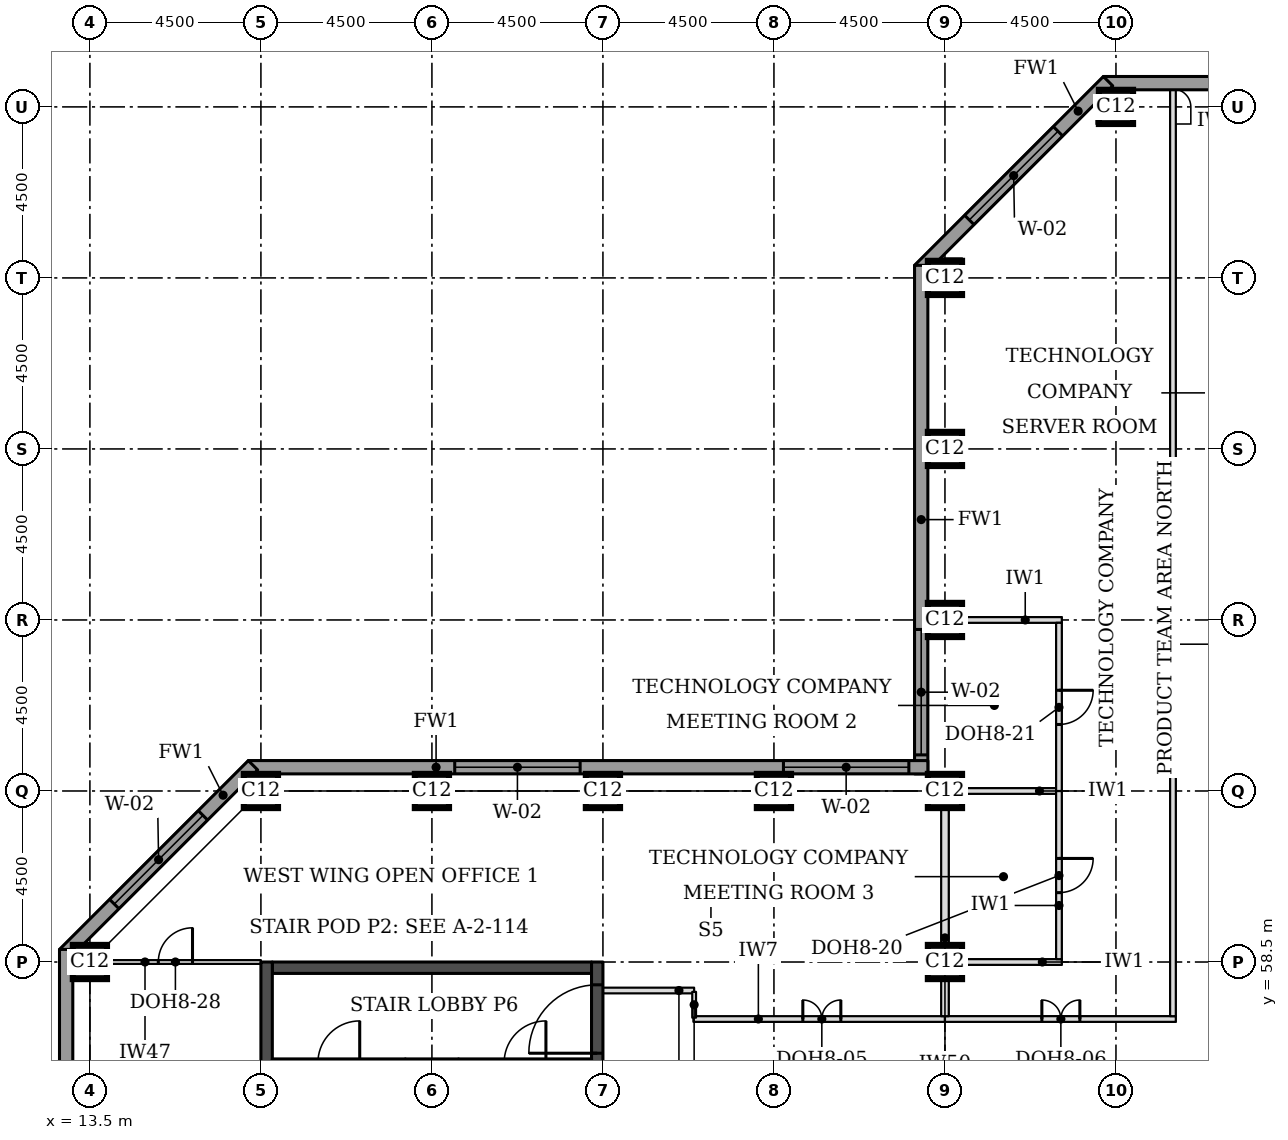
"""IFC4 building model, lengths in metres.
Left out: names, types, materials, properties, quantities, classifications, styles, units other than length and angle.
Written with IfcOpenShell. Run it as: python <this file> out.ifc"""

import sys

from ifc_helpers import new_model, si_unit, direction, frame, frame_2d, origin, origin_2d, place, context, subcontext, project, spatial, rectangle, extrude, element, fill, save


model = new_model("IFC4")
c1 = context("Model", 3, precision=1e-05, world=origin(), true_north=direction((0.0, 1.0)))
c2 = subcontext(c1, "Body", "Model", "MODEL_VIEW")
j1 = project(units=[si_unit("LENGTHUNIT", "METRE"), si_unit("PLANEANGLEUNIT", "RADIAN")], contexts=[c1])
p1 = place(None, origin())
s1 = spatial("IfcSite", under=j1, at=p1, CompositionType="ELEMENT")
p2 = place(p1, origin())
s2 = spatial("IfcBuilding", under=s1, at=p2, CompositionType="ELEMENT")
p3 = place(p2, frame((0.0, 0.0, 199.5)))
s3 = spatial("IfcBuildingStorey", under=s2, at=p3, CompositionType="ELEMENT", Elevation=199.5)
for number, where, z_axis, x_axis in (
    (1, (13.5, 58.5, 0.0), (0.0, 0.0, 1.0), (1.0, 0.0, 0.0)),
    (2, (36.0, 58.5, 0.0), (0.0, 0.0, 1.0), (1.0, 0.0, 0.0)),
    (3, (18.0, 63.0, 0.0), (0.0, 0.0, 1.0), (1.0, 0.0, 0.0)),
    (4, (22.5, 63.0, 0.0), (0.0, 0.0, 1.0), (1.0, 0.0, 0.0)),
    (5, (27.0, 63.0, 0.0), (0.0, 0.0, 1.0), (1.0, 0.0, 0.0)),
    (6, (31.5, 63.0, 0.0), (0.0, 0.0, 1.0), (1.0, 0.0, 0.0)),
    (7, (36.0, 63.0, 0.0), (0.0, 0.0, 1.0), (1.0, 0.0, 0.0)),
    (8, (36.0, 67.5, 0.0), (0.0, 0.0, 1.0), (1.0, 0.0, 0.0)),
    (9, (36.0, 72.0, 0.0), (0.0, 0.0, 1.0), (1.0, 0.0, 0.0)),
    (10, (36.0, 76.5, 0.0), (0.0, 0.0, 1.0), (1.0, 0.0, 0.0)),
    (11, (40.5, 81.0, 0.0), (0.0, 0.0, 1.0), (1.0, 0.0, 0.0)),
):
    element("IfcColumn", number, at=place(p3, frame(where, z_axis=z_axis, x_axis=x_axis)), inside=s3, PredefinedType="COLUMN", context=c2, shape_type="SweptSolid", body=[
        extrude(rectangle(XDim=0.9, YDim=0.9, at=origin_2d()), origin(), (0.0, 0.0, 1.0), 3.7),
    ])
p4 = place(p3, frame((18.3, 58.35, 0.0), z_axis=(0.0, 0.0, 1.0), x_axis=(1.0, 0.0, 0.0)))
e12 = element("IfcWall", 12, at=p4, inside=s3, PredefinedType="SHEAR", context=c2, shape_type="SweptSolid", body=[
    extrude(rectangle(XDim=8.4, YDim=0.3, at=frame_2d((4.2, 0.0))), origin(), (0.0, 0.0, 1.0), 3.7),
])
p5 = place(p3, frame((18.15, 49.5, 0.0), z_axis=(0.0, 0.0, 1.0), x_axis=(0.0, 1.0, 0.0)))
e13 = element("IfcWall", 13, at=p5, inside=s3, PredefinedType="SHEAR", context=c2, shape_type="SweptSolid", body=[
    extrude(rectangle(XDim=9.0, YDim=0.3, at=frame_2d((4.5, 0.0))), origin(), (0.0, 0.0, 1.0), 3.7),
])
p6 = place(p3, frame((26.85, 49.5, 0.0), z_axis=(0.0, 0.0, 1.0), x_axis=(0.0, 1.0, 0.0)))
e14 = element("IfcWall", 14, at=p6, inside=s3, PredefinedType="SHEAR", context=c2, shape_type="SweptSolid", body=[
    extrude(rectangle(XDim=9.0, YDim=0.3, at=frame_2d((4.5, 0.0))), origin(), (0.0, 0.0, 1.0), 3.7),
])
p7 = place(p6, frame((6.6, 0.0, 0.0)))
e15 = element("IfcOpeningElement", 15, at=p7, cuts=e14, PredefinedType="OPENING", context=c2, shape_type="SweptSolid", body=[
    extrude(rectangle(XDim=1.8, YDim=2.1, at=frame_2d((0.9, 1.05))), frame((0.0, 0.16, 0.0), z_axis=(0.0, -1.0, 0.0), x_axis=(1.0, 0.0, 0.0)), (0.0, 0.0, 1.0), 0.32),
])
p8 = place(p3, frame((72.331, 81.625, 0.0), z_axis=(0.0, 0.0, 1.0), x_axis=(-1.0, 0.0, 0.0)))
e16 = element("IfcWall", 16, at=p8, inside=s3, PredefinedType="STANDARD", context=c2, shape_type="SweptSolid", body=[
    extrude(rectangle(XDim=32.163, YDim=0.35, at=frame_2d((16.081, 0.0))), origin(), (0.0, 0.0, 1.0), 3.525),
])
p9 = place(p8, frame((5.431, 0.0, 0.9)))
e17 = element("IfcOpeningElement", 17, at=p9, cuts=e16, PredefinedType="OPENING", context=c2, shape_type="SweptSolid", body=[
    extrude(rectangle(XDim=3.3, YDim=1.9, at=frame_2d((1.65, 0.95))), frame((0.0, 0.185, 0.0), z_axis=(0.0, -1.0, 0.0), x_axis=(1.0, 0.0, 0.0)), (0.0, 0.0, 1.0), 0.37),
])
p10 = place(p8, frame((9.931, 0.0, 0.9)))
e18 = element("IfcOpeningElement", 18, at=p10, cuts=e16, PredefinedType="OPENING", context=c2, shape_type="SweptSolid", body=[
    extrude(rectangle(XDim=3.3, YDim=1.9, at=frame_2d((1.65, 0.95))), frame((0.0, 0.185, 0.0), z_axis=(0.0, -1.0, 0.0), x_axis=(1.0, 0.0, 0.0)), (0.0, 0.0, 1.0), 0.37),
])
p11 = place(p8, frame((14.431, 0.0, 0.9)))
e19 = element("IfcOpeningElement", 19, at=p11, cuts=e16, PredefinedType="OPENING", context=c2, shape_type="SweptSolid", body=[
    extrude(rectangle(XDim=3.3, YDim=1.9, at=frame_2d((1.65, 0.95))), frame((0.0, 0.185, 0.0), z_axis=(0.0, -1.0, 0.0), x_axis=(1.0, 0.0, 0.0)), (0.0, 0.0, 1.0), 0.37),
])
p12 = place(p8, frame((18.931, 0.0, 0.9)))
e20 = element("IfcOpeningElement", 20, at=p12, cuts=e16, PredefinedType="OPENING", context=c2, shape_type="SweptSolid", body=[
    extrude(rectangle(XDim=3.3, YDim=1.9, at=frame_2d((1.65, 0.95))), frame((0.0, 0.185, 0.0), z_axis=(0.0, -1.0, 0.0), x_axis=(1.0, 0.0, 0.0)), (0.0, 0.0, 1.0), 0.37),
])
p13 = place(p8, frame((23.431, 0.0, 0.9)))
e21 = element("IfcOpeningElement", 21, at=p13, cuts=e16, PredefinedType="OPENING", context=c2, shape_type="SweptSolid", body=[
    extrude(rectangle(XDim=3.3, YDim=1.9, at=frame_2d((1.65, 0.95))), frame((0.0, 0.185, 0.0), z_axis=(0.0, -1.0, 0.0), x_axis=(1.0, 0.0, 0.0)), (0.0, 0.0, 1.0), 0.37),
])
p14 = place(p3, frame((40.292, 81.676, 0.0), z_axis=(0.0, 0.0, 1.0), x_axis=(-0.707106781187, -0.707106781187, 0.0)))
e22 = element("IfcWall", 22, at=p14, inside=s3, PredefinedType="STANDARD", context=c2, shape_type="SweptSolid", body=[
    extrude(rectangle(XDim=7.027, YDim=0.35, at=frame_2d((3.513, 0.0))), origin(), (0.0, 0.0, 1.0), 3.525),
])
p15 = place(p14, frame((1.863, 0.0, 0.9)))
e23 = element("IfcOpeningElement", 23, at=p15, cuts=e22, PredefinedType="OPENING", context=c2, shape_type="SweptSolid", body=[
    extrude(rectangle(XDim=3.3, YDim=1.9, at=frame_2d((1.65, 0.95))), frame((0.0, 0.185, 0.0), z_axis=(0.0, -1.0, 0.0), x_axis=(1.0, 0.0, 0.0)), (0.0, 0.0, 1.0), 0.37),
])
p16 = place(p3, frame((35.375, 76.831, 0.0), z_axis=(0.0, 0.0, 1.0), x_axis=(0.0, -1.0, 0.0)))
e24 = element("IfcWall", 24, at=p16, inside=s3, PredefinedType="STANDARD", context=c2, shape_type="SweptSolid", body=[
    extrude(rectangle(XDim=13.381, YDim=0.35, at=frame_2d((6.691, 0.0))), origin(), (0.0, 0.0, 1.0), 3.525),
])
p17 = place(p16, frame((9.581, 0.0, 0.9)))
e25 = element("IfcOpeningElement", 25, at=p17, cuts=e24, PredefinedType="OPENING", context=c2, shape_type="SweptSolid", body=[
    extrude(rectangle(XDim=3.3, YDim=1.9, at=frame_2d((1.65, 0.95))), frame((0.0, 0.185, 0.0), z_axis=(0.0, -1.0, 0.0), x_axis=(1.0, 0.0, 0.0)), (0.0, 0.0, 1.0), 0.37),
])
p18 = place(p3, frame((35.55, 63.625, 0.0), z_axis=(0.0, 0.0, 1.0), x_axis=(-1.0, 0.0, 0.0)))
e26 = element("IfcWall", 26, at=p18, inside=s3, PredefinedType="STANDARD", context=c2, shape_type="SweptSolid", body=[
    extrude(rectangle(XDim=17.881, YDim=0.35, at=frame_2d((8.941, 0.0))), origin(), (0.0, 0.0, 1.0), 3.525),
])
p19 = place(p18, frame((0.5, 0.0, 0.9)))
e27 = element("IfcOpeningElement", 27, at=p19, cuts=e26, PredefinedType="OPENING", context=c2, shape_type="SweptSolid", body=[
    extrude(rectangle(XDim=3.3, YDim=1.9, at=frame_2d((1.65, 0.95))), frame((0.0, 0.185, 0.0), z_axis=(0.0, -1.0, 0.0), x_axis=(1.0, 0.0, 0.0)), (0.0, 0.0, 1.0), 0.37),
])
p20 = place(p18, frame((9.15, 0.0, 0.9)))
e28 = element("IfcOpeningElement", 28, at=p20, cuts=e26, PredefinedType="OPENING", context=c2, shape_type="SweptSolid", body=[
    extrude(rectangle(XDim=3.3, YDim=1.9, at=frame_2d((1.65, 0.95))), frame((0.0, 0.185, 0.0), z_axis=(0.0, -1.0, 0.0), x_axis=(1.0, 0.0, 0.0)), (0.0, 0.0, 1.0), 0.37),
])
p21 = place(p3, frame((17.792, 63.676, 0.0), z_axis=(0.0, 0.0, 1.0), x_axis=(-0.707106781187, -0.707106781187, 0.0)))
e29 = element("IfcWall", 29, at=p21, inside=s3, PredefinedType="STANDARD", context=c2, shape_type="SweptSolid", body=[
    extrude(rectangle(XDim=7.027, YDim=0.35, at=frame_2d((3.513, 0.0))), origin(), (0.0, 0.0, 1.0), 3.525),
])
p22 = place(p21, frame((1.863, 0.0, 0.9)))
e30 = element("IfcOpeningElement", 30, at=p22, cuts=e29, PredefinedType="OPENING", context=c2, shape_type="SweptSolid", body=[
    extrude(rectangle(XDim=3.3, YDim=1.9, at=frame_2d((1.65, 0.95))), frame((0.0, 0.185, 0.0), z_axis=(0.0, -1.0, 0.0), x_axis=(1.0, 0.0, 0.0)), (0.0, 0.0, 1.0), 0.37),
])
p23 = place(p3, frame((12.875, 58.831, 0.0), z_axis=(0.0, 0.0, 1.0), x_axis=(0.0, -1.0, 0.0)))
e31 = element("IfcWall", 31, at=p23, inside=s3, PredefinedType="STANDARD", context=c2, shape_type="SweptSolid", body=[
    extrude(rectangle(XDim=14.163, YDim=0.35, at=frame_2d((7.081, 0.0))), origin(), (0.0, 0.0, 1.0), 3.525),
])
p24 = place(p23, frame((5.431, 0.0, 0.9)))
e32 = element("IfcOpeningElement", 32, at=p24, cuts=e31, PredefinedType="OPENING", context=c2, shape_type="SweptSolid", body=[
    extrude(rectangle(XDim=3.3, YDim=1.9, at=frame_2d((1.65, 0.95))), frame((0.0, 0.185, 0.0), z_axis=(0.0, -1.0, 0.0), x_axis=(1.0, 0.0, 0.0)), (0.0, 0.0, 1.0), 0.37),
])
p25 = place(p3, frame((29.38, 57.0, 0.0), z_axis=(0.0, 0.0, 1.0), x_axis=(1.0, 0.0, 0.0)))
e33 = element("IfcWall", 33, at=p25, inside=s3, PredefinedType="PARTITIONING", context=c2, shape_type="SweptSolid", body=[
    extrude(rectangle(XDim=6.62, YDim=0.15, at=frame_2d((3.31, 0.0))), origin(), (0.0, 0.0, 1.0), 3.55),
])
p26 = place(p25, frame((2.88, 0.0, 0.0)))
e34 = element("IfcOpeningElement", 34, at=p26, cuts=e33, PredefinedType="OPENING", context=c2, shape_type="SweptSolid", body=[
    extrude(rectangle(XDim=1.0, YDim=2.1, at=frame_2d((0.5, 1.05))), frame((0.0, 0.085, 0.0), z_axis=(0.0, -1.0, 0.0), x_axis=(1.0, 0.0, 0.0)), (0.0, 0.0, 1.0), 0.17),
])
p27 = place(p3, frame((36.0, 57.0, 0.0), z_axis=(0.0, 0.0, 1.0), x_axis=(1.0, 0.0, 0.0)))
e35 = element("IfcWall", 35, at=p27, inside=s3, PredefinedType="PARTITIONING", context=c2, shape_type="SweptSolid", body=[
    extrude(rectangle(XDim=6.075, YDim=0.15, at=frame_2d((3.038, 0.0))), origin(), (0.0, 0.0, 1.0), 3.55),
])
p28 = place(p27, frame((2.55, 0.0, 0.0)))
e36 = element("IfcOpeningElement", 36, at=p28, cuts=e35, PredefinedType="OPENING", context=c2, shape_type="SweptSolid", body=[
    extrude(rectangle(XDim=1.0, YDim=2.1, at=frame_2d((0.5, 1.05))), frame((0.0, 0.085, 0.0), z_axis=(0.0, -1.0, 0.0), x_axis=(1.0, 0.0, 0.0)), (0.0, 0.0, 1.0), 0.17),
])
p29 = place(p3, frame((36.45, 58.5, 0.0), z_axis=(0.0, 0.0, 1.0), x_axis=(1.0, 0.0, 0.0)))
e37 = element("IfcWall", 37, at=p29, inside=s3, PredefinedType="PARTITIONING", context=c2, shape_type="SweptSolid", body=[
    extrude(rectangle(XDim=2.625, YDim=0.15, at=frame_2d((1.312, 0.0))), origin(), (0.0, 0.0, 1.0), 3.55),
])
p30 = place(p3, frame((36.45, 63.0, 0.0), z_axis=(0.0, 0.0, 1.0), x_axis=(1.0, 0.0, 0.0)))
e38 = element("IfcWall", 38, at=p30, inside=s3, PredefinedType="PARTITIONING", context=c2, shape_type="SweptSolid", body=[
    extrude(rectangle(XDim=2.475, YDim=0.15, at=frame_2d((1.238, 0.0))), origin(), (0.0, 0.0, 1.0), 3.55),
])
p31 = place(p3, frame((35.55, 67.5, 0.0), z_axis=(0.0, 0.0, 1.0), x_axis=(1.0, 0.0, 0.0)))
e39 = element("IfcWall", 39, at=p31, inside=s3, PredefinedType="PARTITIONING", context=c2, shape_type="SweptSolid", body=[
    extrude(rectangle(XDim=3.525, YDim=0.15, at=frame_2d((1.762, 0.0))), origin(), (0.0, 0.0, 1.0), 3.55),
])
p32 = place(p3, frame((36.0, 57.075, 0.0), z_axis=(0.0, 0.0, 1.0), x_axis=(0.0, 1.0, 0.0)))
e40 = element("IfcWall", 40, at=p32, inside=s3, PredefinedType="PARTITIONING", context=c2, shape_type="SweptSolid", body=[
    extrude(rectangle(XDim=0.975, YDim=0.2, at=frame_2d((0.488, 0.0))), origin(), (0.0, 0.0, 1.0), 2.8),
])
p33 = place(p3, frame((42.0, 57.075, 0.0), z_axis=(0.0, 0.0, 1.0), x_axis=(0.0, 1.0, 0.0)))
e41 = element("IfcWall", 41, at=p33, inside=s3, PredefinedType="PARTITIONING", context=c2, shape_type="SweptSolid", body=[
    extrude(rectangle(XDim=24.375, YDim=0.15, at=frame_2d((12.188, 0.0))), origin(), (0.0, 0.0, 1.0), 3.55),
])
p34 = place(p3, frame((39.0, 58.575, 0.0), z_axis=(0.0, 0.0, 1.0), x_axis=(0.0, 1.0, 0.0)))
e42 = element("IfcWall", 42, at=p34, inside=s3, PredefinedType="PARTITIONING", context=c2, shape_type="SweptSolid", body=[
    extrude(rectangle(XDim=4.425, YDim=0.15, at=frame_2d((2.212, 0.0))), origin(), (0.0, 0.0, 1.0), 3.55),
])
p35 = place(p34, frame((1.75, 0.0, 0.0)))
e43 = element("IfcOpeningElement", 43, at=p35, cuts=e42, PredefinedType="OPENING", context=c2, shape_type="SweptSolid", body=[
    extrude(rectangle(XDim=0.9, YDim=2.1, at=frame_2d((0.45, 1.05))), frame((0.0, 0.085, 0.0), z_axis=(0.0, -1.0, 0.0), x_axis=(1.0, 0.0, 0.0)), (0.0, 0.0, 1.0), 0.17),
])
p36 = place(p3, frame((36.0, 58.92, 0.0), z_axis=(0.0, 0.0, 1.0), x_axis=(0.0, 1.0, 0.0)))
e44 = element("IfcWall", 44, at=p36, inside=s3, PredefinedType="PARTITIONING", context=c2, shape_type="SweptSolid", body=[
    extrude(rectangle(XDim=3.63, YDim=0.2, at=frame_2d((1.815, 0.0))), origin(), (0.0, 0.0, 1.0), 2.8),
])
p37 = place(p3, frame((39.0, 63.0, 0.0), z_axis=(0.0, 0.0, 1.0), x_axis=(0.0, 1.0, 0.0)))
e45 = element("IfcWall", 45, at=p37, inside=s3, PredefinedType="PARTITIONING", context=c2, shape_type="SweptSolid", body=[
    extrude(rectangle(XDim=4.425, YDim=0.15, at=frame_2d((2.212, 0.0))), origin(), (0.0, 0.0, 1.0), 3.55),
])
p38 = place(p37, frame((1.75, 0.0, 0.0)))
e46 = element("IfcOpeningElement", 46, at=p38, cuts=e45, PredefinedType="OPENING", context=c2, shape_type="SweptSolid", body=[
    extrude(rectangle(XDim=0.9, YDim=2.1, at=frame_2d((0.45, 1.05))), frame((0.0, 0.085, 0.0), z_axis=(0.0, -1.0, 0.0), x_axis=(1.0, 0.0, 0.0)), (0.0, 0.0, 1.0), 0.17),
])
p39 = place(p3, frame((13.5, 58.5, 0.0), z_axis=(0.0, 0.0, 1.0), x_axis=(1.0, 0.0, 0.0)))
e47 = element("IfcWall", 47, at=p39, inside=s3, PredefinedType="PARTITIONING", context=c2, shape_type="SweptSolid", body=[
    extrude(rectangle(XDim=4.5, YDim=0.1, at=frame_2d((2.25, 0.0))), origin(), (0.0, 0.0, 1.0), 2.55),
])
p40 = place(p39, frame((1.8, 0.0, 0.0)))
e48 = element("IfcOpeningElement", 48, at=p40, cuts=e47, PredefinedType="OPENING", context=c2, shape_type="SweptSolid", body=[
    extrude(rectangle(XDim=0.9, YDim=2.1, at=frame_2d((0.45, 1.05))), frame((0.0, 0.06, 0.0), z_axis=(0.0, -1.0, 0.0), x_axis=(1.0, 0.0, 0.0)), (0.0, 0.0, 1.0), 0.12),
])
p41 = place(p3, frame((27.0, 57.75, 0.0), z_axis=(0.0, 0.0, 1.0), x_axis=(1.0, 0.0, 0.0)))
e49 = element("IfcWall", 49, at=p41, inside=s3, PredefinedType="PARTITIONING", context=c2, shape_type="SweptSolid", body=[
    extrude(rectangle(XDim=2.4, YDim=0.15, at=frame_2d((1.2, 0.0))), origin(), (0.0, 0.0, 1.0), 3.55),
])
p42 = place(p3, frame((29.4, 57.715, 0.0), z_axis=(0.0, 0.0, 1.0), x_axis=(0.0, -1.0, 0.0)))
e50 = element("IfcWall", 50, at=p42, inside=s3, PredefinedType="PARTITIONING", context=c2, shape_type="SweptSolid", body=[
    extrude(rectangle(XDim=0.68, YDim=0.1, at=frame_2d((0.34, 0.0))), origin(), (0.0, 0.0, 1.0), 3.55),
])
p43 = place(p3, frame((21.8, 55.85, 0.0), z_axis=(0.0, 0.0, 1.0), x_axis=(1.0, 0.0, 0.0)))
e51 = element("IfcWall", 51, at=p43, inside=s3, PredefinedType="SOLIDWALL", context=c2, shape_type="SweptSolid", body=[
    extrude(rectangle(XDim=1.4, YDim=0.2, at=frame_2d((0.7, 0.0))), origin(), (0.0, 0.0, 1.0), 3.55),
])
p44 = place(p3, frame((18.3, 55.85, 0.0), z_axis=(0.0, 0.0, 1.0), x_axis=(1.0, 0.0, 0.0)))
e52 = element("IfcWall", 52, at=p44, inside=s3, PredefinedType="SOLIDWALL", context=c2, shape_type="SweptSolid", body=[
    extrude(rectangle(XDim=3.5, YDim=0.2, at=frame_2d((1.75, 0.0))), origin(), (0.0, 0.0, 1.0), 3.55),
])
p45 = place(p44, frame((1.2, 0.0, 0.0)))
e53 = element("IfcOpeningElement", 53, at=p45, cuts=e52, PredefinedType="OPENING", context=c2, shape_type="SweptSolid", body=[
    extrude(rectangle(XDim=1.1, YDim=2.1, at=frame_2d((0.55, 1.05))), frame((0.0, 0.11, 0.0), z_axis=(0.0, -1.0, 0.0), x_axis=(1.0, 0.0, 0.0)), (0.0, 0.0, 1.0), 0.22),
])
p46 = place(p3, frame((23.2, 55.85, 0.0), z_axis=(0.0, 0.0, 1.0), x_axis=(1.0, 0.0, 0.0)))
e54 = element("IfcWall", 54, at=p46, inside=s3, PredefinedType="SOLIDWALL", context=c2, shape_type="SweptSolid", body=[
    extrude(rectangle(XDim=3.5, YDim=0.2, at=frame_2d((1.75, 0.0))), origin(), (0.0, 0.0, 1.0), 3.55),
])
p47 = place(p46, frame((1.2, 0.0, 0.0)))
e55 = element("IfcOpeningElement", 55, at=p47, cuts=e54, PredefinedType="OPENING", context=c2, shape_type="SweptSolid", body=[
    extrude(rectangle(XDim=1.1, YDim=2.1, at=frame_2d((0.55, 1.05))), frame((0.0, 0.11, 0.0), z_axis=(0.0, -1.0, 0.0), x_axis=(1.0, 0.0, 0.0)), (0.0, 0.0, 1.0), 0.22),
])
p48 = place(p15, origin())
e56 = element("IfcWindow", 56, at=p48, inside=s3, PartitioningType="SINGLE_PANEL", PredefinedType="WINDOW", context=c2, shape_type="SweptSolid", body=[
    extrude(rectangle(XDim=3.3, YDim=1.9, at=frame_2d((1.65, 0.95))), frame((0.0, 0.085, 0.0), z_axis=(0.0, -1.0, 0.0), x_axis=(1.0, 0.0, 0.0)), (0.0, 0.0, 1.0), 0.06),
])
fill(e23, e56)
p49 = place(p17, origin())
e57 = element("IfcWindow", 57, at=p49, inside=s3, PartitioningType="SINGLE_PANEL", PredefinedType="WINDOW", context=c2, shape_type="SweptSolid", body=[
    extrude(rectangle(XDim=3.3, YDim=1.9, at=frame_2d((1.65, 0.95))), frame((0.0, 0.085, 0.0), z_axis=(0.0, -1.0, 0.0), x_axis=(1.0, 0.0, 0.0)), (0.0, 0.0, 1.0), 0.06),
])
fill(e25, e57)
p50 = place(p19, origin())
e58 = element("IfcWindow", 58, at=p50, inside=s3, PartitioningType="SINGLE_PANEL", PredefinedType="WINDOW", context=c2, shape_type="SweptSolid", body=[
    extrude(rectangle(XDim=3.3, YDim=1.9, at=frame_2d((1.65, 0.95))), frame((0.0, 0.085, 0.0), z_axis=(0.0, -1.0, 0.0), x_axis=(1.0, 0.0, 0.0)), (0.0, 0.0, 1.0), 0.06),
])
fill(e27, e58)
p51 = place(p20, origin())
e59 = element("IfcWindow", 59, at=p51, inside=s3, PartitioningType="SINGLE_PANEL", PredefinedType="WINDOW", context=c2, shape_type="SweptSolid", body=[
    extrude(rectangle(XDim=3.3, YDim=1.9, at=frame_2d((1.65, 0.95))), frame((0.0, 0.085, 0.0), z_axis=(0.0, -1.0, 0.0), x_axis=(1.0, 0.0, 0.0)), (0.0, 0.0, 1.0), 0.06),
])
fill(e28, e59)
p52 = place(p22, origin())
e60 = element("IfcWindow", 60, at=p52, inside=s3, PartitioningType="SINGLE_PANEL", PredefinedType="WINDOW", context=c2, shape_type="SweptSolid", body=[
    extrude(rectangle(XDim=3.3, YDim=1.9, at=frame_2d((1.65, 0.95))), frame((0.0, 0.085, 0.0), z_axis=(0.0, -1.0, 0.0), x_axis=(1.0, 0.0, 0.0)), (0.0, 0.0, 1.0), 0.06),
])
fill(e30, e60)
p53 = place(p28, origin())
e61 = element("IfcDoor", 61, at=p53, inside=s3, OperationType="DOUBLE_DOOR_SINGLE_SWING", PredefinedType="DOOR", context=c2, shape_type="SweptSolid", body=[
    extrude(rectangle(XDim=1.0, YDim=2.1, at=frame_2d((0.5, 1.05))), frame((0.0, 0.025, 0.0), z_axis=(0.0, -1.0, 0.0), x_axis=(1.0, 0.0, 0.0)), (0.0, 0.0, 1.0), 0.05),
])
fill(e36, e61)
p54 = place(p35, frame((0.9, 0.0, 0.0), z_axis=(0.0, 0.0, 1.0), x_axis=(-1.0, 0.0, 0.0)))
e62 = element("IfcDoor", 62, at=p54, inside=s3, OperationType="SINGLE_SWING_LEFT", PredefinedType="DOOR", context=c2, shape_type="SweptSolid", body=[
    extrude(rectangle(XDim=0.9, YDim=2.1, at=frame_2d((0.45, 1.05))), frame((0.0, 0.025, 0.0), z_axis=(0.0, -1.0, 0.0), x_axis=(1.0, 0.0, 0.0)), (0.0, 0.0, 1.0), 0.05),
])
fill(e43, e62)
p55 = place(p38, frame((0.9, 0.0, 0.0), z_axis=(0.0, 0.0, 1.0), x_axis=(-1.0, 0.0, 0.0)))
e63 = element("IfcDoor", 63, at=p55, inside=s3, OperationType="SINGLE_SWING_LEFT", PredefinedType="DOOR", context=c2, shape_type="SweptSolid", body=[
    extrude(rectangle(XDim=0.9, YDim=2.1, at=frame_2d((0.45, 1.05))), frame((0.0, 0.025, 0.0), z_axis=(0.0, -1.0, 0.0), x_axis=(1.0, 0.0, 0.0)), (0.0, 0.0, 1.0), 0.05),
])
fill(e46, e63)
p56 = place(p26, origin())
e64 = element("IfcDoor", 64, at=p56, inside=s3, OperationType="DOUBLE_DOOR_SINGLE_SWING", PredefinedType="DOOR", context=c2, shape_type="SweptSolid", body=[
    extrude(rectangle(XDim=1.0, YDim=2.1, at=frame_2d((0.5, 1.05))), frame((0.0, 0.025, 0.0), z_axis=(0.0, -1.0, 0.0), x_axis=(1.0, 0.0, 0.0)), (0.0, 0.0, 1.0), 0.05),
])
fill(e34, e64)
p57 = place(p40, origin())
e65 = element("IfcDoor", 65, at=p57, inside=s3, OperationType="SINGLE_SWING_RIGHT", PredefinedType="DOOR", context=c2, shape_type="SweptSolid", body=[
    extrude(rectangle(XDim=0.9, YDim=2.1, at=frame_2d((0.45, 1.05))), frame((0.0, 0.025, 0.0), z_axis=(0.0, -1.0, 0.0), x_axis=(1.0, 0.0, 0.0)), (0.0, 0.0, 1.0), 0.05),
])
fill(e48, e65)
p58 = place(p7, origin())
e66 = element("IfcDoor", 66, at=p58, inside=s3, OperationType="SINGLE_SWING_LEFT", PredefinedType="DOOR", context=c2, shape_type="SweptSolid", body=[
    extrude(rectangle(XDim=1.8, YDim=2.1, at=frame_2d((0.9, 1.05))), frame((0.0, 0.025, 0.0), z_axis=(0.0, -1.0, 0.0), x_axis=(1.0, 0.0, 0.0)), (0.0, 0.0, 1.0), 0.05),
])
fill(e15, e66)
save(model, sys.argv[1])
